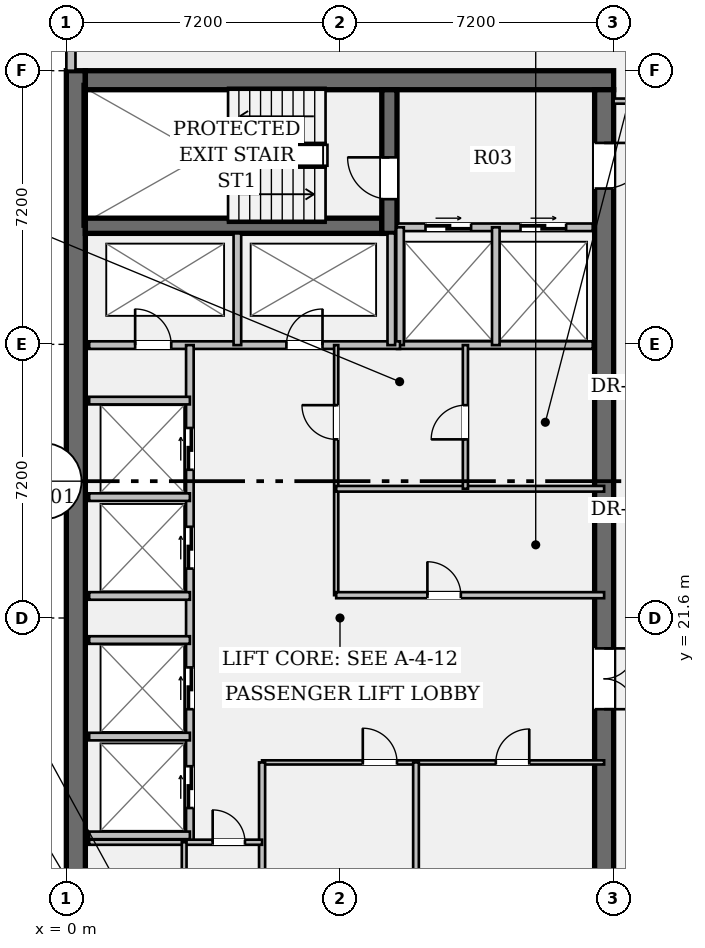
"""IFC4 building model, lengths in metres.
Left out: names, types, materials, properties, quantities, classifications, styles, units other than length and angle.
Written with IfcOpenShell. Run it as: python <this file> out.ifc"""

import sys

from ifc_helpers import new_model, si_unit, direction, frame, frame_2d, origin, place, context, subcontext, project, spatial, rectangle, extrude, element, fill, save


model = new_model("IFC4")
c1 = context("Model", 3, precision=1e-05, world=origin(), true_north=direction((0.0, 1.0)))
c2 = subcontext(c1, "Body", "Model", "MODEL_VIEW")
j1 = project(units=[si_unit("LENGTHUNIT", "METRE"), si_unit("PLANEANGLEUNIT", "RADIAN")], contexts=[c1])
p1 = place(None, origin())
s1 = spatial("IfcSite", under=j1, at=p1, CompositionType="ELEMENT")
p2 = place(p1, origin())
s2 = spatial("IfcBuilding", under=s1, at=p2, CompositionType="ELEMENT")
p3 = place(p2, frame((0.0, 0.0, 211.75)))
s3 = spatial("IfcBuildingStorey", under=s2, at=p3, CompositionType="ELEMENT", Elevation=211.75)
p4 = place(p3, frame((0.25, 7.2, 0.0), z_axis=(0.0, 0.0, 1.0), x_axis=(0.0, 1.0, 0.0)))
e1 = element("IfcWall", 1, at=p4, inside=s3, PredefinedType="SHEAR", context=c2, shape_type="SweptSolid", body=[
    extrude(rectangle(XDim=28.8, YDim=0.5, at=frame_2d((14.4, 0.0))), origin(), (0.0, 0.0, 1.0), 3.24),
])
p5 = place(p3, frame((0.5, 35.75, 0.0), z_axis=(0.0, 0.0, 1.0), x_axis=(1.0, 0.0, 0.0)))
e2 = element("IfcWall", 2, at=p5, inside=s3, PredefinedType="SHEAR", context=c2, shape_type="SweptSolid", body=[
    extrude(rectangle(XDim=13.9, YDim=0.5, at=frame_2d((6.95, 0.0))), origin(), (0.0, 0.0, 1.0), 3.24),
])
p6 = place(p3, frame((14.15, 35.5, 0.0), z_axis=(0.0, 0.0, 1.0), x_axis=(0.0, -1.0, 0.0)))
e3 = element("IfcWall", 3, at=p6, inside=s3, PredefinedType="SHEAR", context=c2, shape_type="SweptSolid", body=[
    extrude(rectangle(XDim=27.8, YDim=0.5, at=frame_2d((13.9, 0.0))), origin(), (0.0, 0.0, 1.0), 3.24),
])
p7 = place(p6, frame((1.4, 0.0, 0.0)))
e4 = element("IfcOpeningElement", 4, at=p7, cuts=e3, PredefinedType="OPENING", context=c2, shape_type="SweptSolid", body=[
    extrude(rectangle(XDim=1.2, YDim=2.15, at=frame_2d((0.6, 1.075))), frame((0.0, 0.262, 0.0), z_axis=(0.0, -1.0, 0.0), x_axis=(1.0, 0.0, 0.0)), (0.0, 0.0, 1.0), 0.524),
])
p8 = place(p6, frame((25.35, 0.0, 0.0)))
e5 = element("IfcOpeningElement", 5, at=p8, cuts=e3, PredefinedType="OPENING", context=c2, shape_type="SweptSolid", body=[
    extrude(rectangle(XDim=1.2, YDim=2.15, at=frame_2d((0.6, 1.075))), frame((0.0, 0.262, 0.0), z_axis=(0.0, -1.0, 0.0), x_axis=(1.0, 0.0, 0.0)), (0.0, 0.0, 1.0), 0.524),
])
p9 = place(p6, frame((14.7, 0.0, 0.0)))
e6 = element("IfcOpeningElement", 6, at=p9, cuts=e3, PredefinedType="OPENING", context=c2, shape_type="SweptSolid", body=[
    extrude(rectangle(XDim=1.6, YDim=2.2, at=frame_2d((0.8, 1.1))), frame((0.0, 0.262, 0.0), z_axis=(0.0, -1.0, 0.0), x_axis=(1.0, 0.0, 0.0)), (0.0, 0.0, 1.0), 0.524),
])
p10 = place(p3, frame((0.5, 31.92, 0.0), z_axis=(0.0, 0.0, 1.0), x_axis=(1.0, 0.0, 0.0)))
e7 = element("IfcWall", 7, at=p10, inside=s3, PredefinedType="SHEAR", context=c2, shape_type="SweptSolid", body=[
    extrude(rectangle(XDim=7.8, YDim=0.4, at=frame_2d((3.9, 0.0))), origin(), (0.0, 0.0, 1.0), 3.24),
])
p11 = place(p3, frame((8.5, 31.72, 0.0), z_axis=(0.0, 0.0, 1.0), x_axis=(0.0, 1.0, 0.0)))
e8 = element("IfcWall", 8, at=p11, inside=s3, PredefinedType="SHEAR", context=c2, shape_type="SweptSolid", body=[
    extrude(rectangle(XDim=3.78, YDim=0.4, at=frame_2d((1.89, 0.0))), origin(), (0.0, 0.0, 1.0), 3.24),
])
p12 = place(p11, frame((0.9, 0.0, 0.0)))
e9 = element("IfcOpeningElement", 9, at=p12, cuts=e8, PredefinedType="OPENING", context=c2, shape_type="SweptSolid", body=[
    extrude(rectangle(XDim=1.1, YDim=2.15, at=frame_2d((0.55, 1.075))), frame((0.0, 0.212, 0.0), z_axis=(0.0, -1.0, 0.0), x_axis=(1.0, 0.0, 0.0)), (0.0, 0.0, 1.0), 0.424),
])
p13 = place(p3, frame((0.12, 36.0, 0.0), z_axis=(0.0, 0.0, 1.0), x_axis=(0.0, 1.0, 0.0)))
e10 = element("IfcWall", 10, at=p13, inside=s3, PredefinedType="STANDARD", context=c2, shape_type="SweptSolid", body=[
    extrude(rectangle(XDim=1.25, YDim=0.24, at=frame_2d((0.625, 0.0))), origin(), (0.0, 0.0, 1.0), 3.24),
])
p14 = place(p3, frame((8.7, 31.88, 0.0), z_axis=(0.0, 0.0, 1.0), x_axis=(1.0, 0.0, 0.0)))
e11 = element("IfcWall", 11, at=p14, inside=s3, PredefinedType="PARTITIONING", context=c2, shape_type="SweptSolid", body=[
    extrude(rectangle(XDim=5.15, YDim=0.2, at=frame_2d((2.575, 0.0))), origin(), (0.0, 0.0, 1.0), 3.24),
])
p15 = place(p14, frame((0.75, 0.0, 0.0)))
e12 = element("IfcOpeningElement", 12, at=p15, cuts=e11, PredefinedType="OPENING", context=c2, shape_type="SweptSolid", body=[
    extrude(rectangle(XDim=1.2, YDim=2.2, at=frame_2d((0.6, 1.1))), frame((0.0, 0.112, 0.0), z_axis=(0.0, -1.0, 0.0), x_axis=(1.0, 0.0, 0.0)), (0.0, 0.0, 1.0), 0.224),
])
p16 = place(p14, frame((3.25, 0.0, 0.0)))
e13 = element("IfcOpeningElement", 13, at=p16, cuts=e11, PredefinedType="OPENING", context=c2, shape_type="SweptSolid", body=[
    extrude(rectangle(XDim=1.2, YDim=2.2, at=frame_2d((0.6, 1.1))), frame((0.0, 0.112, 0.0), z_axis=(0.0, -1.0, 0.0), x_axis=(1.0, 0.0, 0.0)), (0.0, 0.0, 1.0), 0.224),
])
p17 = place(p3, frame((8.7, 28.78, 0.0), z_axis=(0.0, 0.0, 1.0), x_axis=(1.0, 0.0, 0.0)))
e14 = element("IfcWall", 14, at=p17, inside=s3, PredefinedType="PARTITIONING", context=c2, shape_type="SweptSolid", body=[
    extrude(rectangle(XDim=5.15, YDim=0.2, at=frame_2d((2.575, 0.0))), origin(), (0.0, 0.0, 1.0), 3.24),
])
for number, where, z_axis, x_axis in (
    (15, (8.78, 28.78, 0.0), (0.0, 0.0, 1.0), (0.0, 1.0, 0.0)),
    (16, (11.3, 28.78, 0.0), (0.0, 0.0, 1.0), (0.0, 1.0, 0.0)),
):
    element("IfcWall", number, at=place(p3, frame(where, z_axis=z_axis, x_axis=x_axis)), inside=s3, PredefinedType="PARTITIONING", context=c2, shape_type="SweptSolid", body=[
        extrude(rectangle(XDim=3.1, YDim=0.2, at=frame_2d((1.55, 0.0))), origin(), (0.0, 0.0, 1.0), 3.24),
    ])
p18 = place(p3, frame((0.6, 28.78, 0.0), z_axis=(0.0, 0.0, 1.0), x_axis=(1.0, 0.0, 0.0)))
e17 = element("IfcWall", 17, at=p18, inside=s3, PredefinedType="PARTITIONING", context=c2, shape_type="SweptSolid", body=[
    extrude(rectangle(XDim=8.18, YDim=0.2, at=frame_2d((4.09, 0.0))), origin(), (0.0, 0.0, 1.0), 3.24),
])
p19 = place(p18, frame((1.21, 0.0, 0.0)))
e18 = element("IfcOpeningElement", 18, at=p19, cuts=e17, PredefinedType="OPENING", context=c2, shape_type="SweptSolid", body=[
    extrude(rectangle(XDim=0.95, YDim=2.15, at=frame_2d((0.475, 1.075))), frame((0.0, 0.112, 0.0), z_axis=(0.0, -1.0, 0.0), x_axis=(1.0, 0.0, 0.0)), (0.0, 0.0, 1.0), 0.224),
])
p20 = place(p18, frame((5.19, 0.0, 0.0)))
e19 = element("IfcOpeningElement", 19, at=p20, cuts=e17, PredefinedType="OPENING", context=c2, shape_type="SweptSolid", body=[
    extrude(rectangle(XDim=0.95, YDim=2.15, at=frame_2d((0.475, 1.075))), frame((0.0, 0.112, 0.0), z_axis=(0.0, -1.0, 0.0), x_axis=(1.0, 0.0, 0.0)), (0.0, 0.0, 1.0), 0.224),
])
for number, where, z_axis, x_axis in (
    (20, (4.5, 28.78, 0.0), (0.0, 0.0, 1.0), (0.0, 1.0, 0.0)),
    (21, (8.55, 28.78, 0.0), (0.0, 0.0, 1.0), (0.0, 1.0, 0.0)),
):
    element("IfcWall", number, at=place(p3, frame(where, z_axis=z_axis, x_axis=x_axis)), inside=s3, PredefinedType="PARTITIONING", context=c2, shape_type="SweptSolid", body=[
        extrude(rectangle(XDim=2.94, YDim=0.2, at=frame_2d((1.47, 0.0))), origin(), (0.0, 0.0, 1.0), 3.24),
    ])
p21 = place(p3, frame((3.25, 15.7, 0.0), z_axis=(0.0, 0.0, 1.0), x_axis=(0.0, 1.0, 0.0)))
e22 = element("IfcWall", 22, at=p21, inside=s3, PredefinedType="PARTITIONING", context=c2, shape_type="SweptSolid", body=[
    extrude(rectangle(XDim=13.08, YDim=0.2, at=frame_2d((6.54, 0.0))), origin(), (0.0, 0.0, 1.0), 3.24),
])
p22 = place(p21, frame((0.9, 0.0, 0.0)))
e23 = element("IfcOpeningElement", 23, at=p22, cuts=e22, PredefinedType="OPENING", context=c2, shape_type="SweptSolid", body=[
    extrude(rectangle(XDim=1.1, YDim=2.2, at=frame_2d((0.55, 1.1))), frame((0.0, 0.112, 0.0), z_axis=(0.0, -1.0, 0.0), x_axis=(1.0, 0.0, 0.0)), (0.0, 0.0, 1.0), 0.224),
])
p23 = place(p21, frame((3.5, 0.0, 0.0)))
e24 = element("IfcOpeningElement", 24, at=p23, cuts=e22, PredefinedType="OPENING", context=c2, shape_type="SweptSolid", body=[
    extrude(rectangle(XDim=1.1, YDim=2.2, at=frame_2d((0.55, 1.1))), frame((0.0, 0.112, 0.0), z_axis=(0.0, -1.0, 0.0), x_axis=(1.0, 0.0, 0.0)), (0.0, 0.0, 1.0), 0.224),
])
p24 = place(p21, frame((7.2, 0.0, 0.0)))
e25 = element("IfcOpeningElement", 25, at=p24, cuts=e22, PredefinedType="OPENING", context=c2, shape_type="SweptSolid", body=[
    extrude(rectangle(XDim=1.1, YDim=2.2, at=frame_2d((0.55, 1.1))), frame((0.0, 0.112, 0.0), z_axis=(0.0, -1.0, 0.0), x_axis=(1.0, 0.0, 0.0)), (0.0, 0.0, 1.0), 0.224),
])
p25 = place(p21, frame((9.8, 0.0, 0.0)))
e26 = element("IfcOpeningElement", 26, at=p25, cuts=e22, PredefinedType="OPENING", context=c2, shape_type="SweptSolid", body=[
    extrude(rectangle(XDim=1.1, YDim=2.2, at=frame_2d((0.55, 1.1))), frame((0.0, 0.112, 0.0), z_axis=(0.0, -1.0, 0.0), x_axis=(1.0, 0.0, 0.0)), (0.0, 0.0, 1.0), 0.224),
])
for number, where, z_axis, x_axis in (
    (27, (0.6, 15.88, 0.0), (0.0, 0.0, 1.0), (1.0, 0.0, 0.0)),
    (28, (0.6, 18.48, 0.0), (0.0, 0.0, 1.0), (1.0, 0.0, 0.0)),
    (29, (0.6, 22.18, 0.0), (0.0, 0.0, 1.0), (1.0, 0.0, 0.0)),
    (30, (0.6, 24.78, 0.0), (0.0, 0.0, 1.0), (1.0, 0.0, 0.0)),
    (31, (0.6, 21.02, 0.0), (0.0, 0.0, 1.0), (1.0, 0.0, 0.0)),
    (32, (0.6, 27.32, 0.0), (0.0, 0.0, 1.0), (1.0, 0.0, 0.0)),
):
    element("IfcWall", number, at=place(p3, frame(where, z_axis=z_axis, x_axis=x_axis)), inside=s3, PredefinedType="PARTITIONING", context=c2, shape_type="SweptSolid", body=[
        extrude(rectangle(XDim=2.65, YDim=0.2, at=frame_2d((1.325, 0.0))), origin(), (0.0, 0.0, 1.0), 3.24),
    ])
p26 = place(p3, frame((7.1, 22.2, 0.0), z_axis=(0.0, 0.0, 1.0), x_axis=(0.0, 1.0, 0.0)))
e33 = element("IfcWall", 33, at=p26, inside=s3, PredefinedType="PARTITIONING", context=c2, shape_type="SweptSolid", body=[
    extrude(rectangle(XDim=6.58, YDim=0.11, at=frame_2d((3.29, 0.0))), origin(), (0.0, 0.0, 1.0), 3.24),
])
p27 = place(p26, frame((4.1, 0.0, 0.0)))
e34 = element("IfcOpeningElement", 34, at=p27, cuts=e33, PredefinedType="OPENING", context=c2, shape_type="SweptSolid", body=[
    extrude(rectangle(XDim=0.9, YDim=2.15, at=frame_2d((0.45, 1.075))), frame((0.0, 0.067, 0.0), z_axis=(0.0, -1.0, 0.0), x_axis=(1.0, 0.0, 0.0)), (0.0, 0.0, 1.0), 0.134),
])
p28 = place(p3, frame((7.1, 22.2, 0.0), z_axis=(0.0, 0.0, 1.0), x_axis=(1.0, 0.0, 0.0)))
e35 = element("IfcWall", 35, at=p28, inside=s3, PredefinedType="PARTITIONING", context=c2, shape_type="SweptSolid", body=[
    extrude(rectangle(XDim=7.05, YDim=0.16, at=frame_2d((3.525, 0.0))), origin(), (0.0, 0.0, 1.0), 3.24),
])
p29 = place(p28, frame((2.4, 0.0, 0.0)))
e36 = element("IfcOpeningElement", 36, at=p29, cuts=e35, PredefinedType="OPENING", context=c2, shape_type="SweptSolid", body=[
    extrude(rectangle(XDim=0.88, YDim=2.15, at=frame_2d((0.44, 1.075))), frame((0.0, 0.092, 0.0), z_axis=(0.0, -1.0, 0.0), x_axis=(1.0, 0.0, 0.0)), (0.0, 0.0, 1.0), 0.184),
])
p30 = place(p3, frame((7.1, 25.0, 0.0), z_axis=(0.0, 0.0, 1.0), x_axis=(1.0, 0.0, 0.0)))
e37 = element("IfcWall", 37, at=p30, inside=s3, PredefinedType="PARTITIONING", context=c2, shape_type="SweptSolid", body=[
    extrude(rectangle(XDim=7.05, YDim=0.15, at=frame_2d((3.525, 0.0))), origin(), (0.0, 0.0, 1.0), 3.24),
])
p31 = place(p3, frame((10.5, 25.0, 0.0), z_axis=(0.0, 0.0, 1.0), x_axis=(0.0, 1.0, 0.0)))
e38 = element("IfcWall", 38, at=p31, inside=s3, PredefinedType="PARTITIONING", context=c2, shape_type="SweptSolid", body=[
    extrude(rectangle(XDim=3.78, YDim=0.135, at=frame_2d((1.89, 0.0))), origin(), (0.0, 0.0, 1.0), 3.24),
])
p32 = place(p31, frame((1.3, 0.0, 0.0)))
e39 = element("IfcOpeningElement", 39, at=p32, cuts=e38, PredefinedType="OPENING", context=c2, shape_type="SweptSolid", body=[
    extrude(rectangle(XDim=0.9, YDim=2.15, at=frame_2d((0.45, 1.075))), frame((0.0, 0.08, 0.0), z_axis=(0.0, -1.0, 0.0), x_axis=(1.0, 0.0, 0.0)), (0.0, 0.0, 1.0), 0.159),
])
p33 = place(p3, frame((5.15, 17.8, 0.0), z_axis=(0.0, 0.0, 1.0), x_axis=(1.0, 0.0, 0.0)))
e40 = element("IfcWall", 40, at=p33, inside=s3, PredefinedType="PARTITIONING", context=c2, shape_type="SweptSolid", body=[
    extrude(rectangle(XDim=9.0, YDim=0.11, at=frame_2d((4.5, 0.0))), origin(), (0.0, 0.0, 1.0), 3.24),
])
p34 = place(p33, frame((2.65, 0.0, 0.0)))
e41 = element("IfcOpeningElement", 41, at=p34, cuts=e40, PredefinedType="OPENING", context=c2, shape_type="SweptSolid", body=[
    extrude(rectangle(XDim=0.9, YDim=2.15, at=frame_2d((0.45, 1.075))), frame((0.0, 0.067, 0.0), z_axis=(0.0, -1.0, 0.0), x_axis=(1.0, 0.0, 0.0)), (0.0, 0.0, 1.0), 0.134),
])
p35 = place(p33, frame((6.15, 0.0, 0.0)))
e42 = element("IfcOpeningElement", 42, at=p35, cuts=e40, PredefinedType="OPENING", context=c2, shape_type="SweptSolid", body=[
    extrude(rectangle(XDim=0.88, YDim=2.15, at=frame_2d((0.44, 1.075))), frame((0.0, 0.067, 0.0), z_axis=(0.0, -1.0, 0.0), x_axis=(1.0, 0.0, 0.0)), (0.0, 0.0, 1.0), 0.134),
])
p36 = place(p3, frame((5.15, 11.2, 0.0), z_axis=(0.0, 0.0, 1.0), x_axis=(0.0, 1.0, 0.0)))
e43 = element("IfcWall", 43, at=p36, inside=s3, PredefinedType="PARTITIONING", context=c2, shape_type="SweptSolid", body=[
    extrude(rectangle(XDim=6.6, YDim=0.16, at=frame_2d((3.3, 0.0))), origin(), (0.0, 0.0, 1.0), 3.24),
])
p37 = place(p3, frame((9.2, 11.2, 0.0), z_axis=(0.0, 0.0, 1.0), x_axis=(0.0, 1.0, 0.0)))
e44 = element("IfcWall", 44, at=p37, inside=s3, PredefinedType="PARTITIONING", context=c2, shape_type="SweptSolid", body=[
    extrude(rectangle(XDim=6.6, YDim=0.15, at=frame_2d((3.3, 0.0))), origin(), (0.0, 0.0, 1.0), 3.24),
])
p38 = place(p3, frame((0.6, 15.7, 0.0), z_axis=(0.0, 0.0, 1.0), x_axis=(1.0, 0.0, 0.0)))
e45 = element("IfcWall", 45, at=p38, inside=s3, PredefinedType="PARTITIONING", context=c2, shape_type="SweptSolid", body=[
    extrude(rectangle(XDim=4.55, YDim=0.135, at=frame_2d((2.275, 0.0))), origin(), (0.0, 0.0, 1.0), 3.24),
])
p39 = place(p38, frame((3.25, 0.0, 0.0)))
e46 = element("IfcOpeningElement", 46, at=p39, cuts=e45, PredefinedType="OPENING", context=c2, shape_type="SweptSolid", body=[
    extrude(rectangle(XDim=0.85, YDim=2.15, at=frame_2d((0.425, 1.075))), frame((0.0, 0.08, 0.0), z_axis=(0.0, -1.0, 0.0), x_axis=(1.0, 0.0, 0.0)), (0.0, 0.0, 1.0), 0.159),
])
p40 = place(p3, frame((3.1, 11.28, 0.0), z_axis=(0.0, 0.0, 1.0), x_axis=(0.0, 1.0, 0.0)))
e47 = element("IfcWall", 47, at=p40, inside=s3, PredefinedType="PARTITIONING", context=c2, shape_type="SweptSolid", body=[
    extrude(rectangle(XDim=4.42, YDim=0.125, at=frame_2d((2.21, 0.0))), origin(), (0.0, 0.0, 1.0), 3.24),
])
p41 = place(p40, frame((0.65, 0.0, 0.0)))
e48 = element("IfcOpeningElement", 48, at=p41, cuts=e47, PredefinedType="OPENING", context=c2, shape_type="SweptSolid", body=[
    extrude(rectangle(XDim=0.85, YDim=2.15, at=frame_2d((0.425, 1.075))), frame((0.0, 0.074, 0.0), z_axis=(0.0, -1.0, 0.0), x_axis=(1.0, 0.0, 0.0)), (0.0, 0.0, 1.0), 0.149),
])
p42 = place(p40, frame((2.75, 0.0, 0.0)))
e49 = element("IfcOpeningElement", 49, at=p42, cuts=e47, PredefinedType="OPENING", context=c2, shape_type="SweptSolid", body=[
    extrude(rectangle(XDim=0.85, YDim=2.15, at=frame_2d((0.425, 1.075))), frame((0.0, 0.074, 0.0), z_axis=(0.0, -1.0, 0.0), x_axis=(1.0, 0.0, 0.0)), (0.0, 0.0, 1.0), 0.149),
])
p43 = place(p3, frame((14.4, 35.2, 0.0), z_axis=(0.0, 0.0, 1.0), x_axis=(1.0, 0.0, 0.0)))
e50 = element("IfcWall", 50, at=p43, inside=s3, PredefinedType="PARTITIONING", context=c2, shape_type="SweptSolid", body=[
    extrude(rectangle(XDim=2.95, YDim=0.135, at=frame_2d((1.475, 0.0))), origin(), (0.0, 0.0, 1.0), 2.808),
])
p44 = place(p43, frame((0.95, 0.0, 0.0)))
e51 = element("IfcOpeningElement", 51, at=p44, cuts=e50, PredefinedType="OPENING", context=c2, shape_type="SweptSolid", body=[
    extrude(rectangle(XDim=1.0, YDim=2.15, at=frame_2d((0.5, 1.075))), frame((0.0, 0.08, 0.0), z_axis=(0.0, -1.0, 0.0), x_axis=(1.0, 0.0, 0.0)), (0.0, 0.0, 1.0), 0.159),
])
p45 = place(p12, origin())
e52 = element("IfcDoor", 52, at=p45, inside=s3, OperationType="SINGLE_SWING_RIGHT", PredefinedType="DOOR", context=c2, shape_type="SweptSolid", body=[
    extrude(rectangle(XDim=1.1, YDim=2.15, at=frame_2d((0.55, 1.075))), frame((0.0, 0.025, 0.0), z_axis=(0.0, -1.0, 0.0), x_axis=(1.0, 0.0, 0.0)), (0.0, 0.0, 1.0), 0.05),
])
fill(e9, e52)
p46 = place(p7, origin())
e53 = element("IfcDoor", 53, at=p46, inside=s3, OperationType="SINGLE_SWING_LEFT", PredefinedType="DOOR", context=c2, shape_type="SweptSolid", body=[
    extrude(rectangle(XDim=1.2, YDim=2.15, at=frame_2d((0.6, 1.075))), frame((0.0, 0.025, 0.0), z_axis=(0.0, -1.0, 0.0), x_axis=(1.0, 0.0, 0.0)), (0.0, 0.0, 1.0), 0.05),
])
fill(e4, e53)
p47 = place(p15, origin())
e54 = element("IfcDoor", 54, at=p47, inside=s3, OperationType="DOUBLE_DOOR_SLIDING", PredefinedType="DOOR", context=c2, shape_type="SweptSolid", body=[
    extrude(rectangle(XDim=1.2, YDim=2.2, at=frame_2d((0.6, 1.1))), frame((0.0, 0.025, 0.0), z_axis=(0.0, -1.0, 0.0), x_axis=(1.0, 0.0, 0.0)), (0.0, 0.0, 1.0), 0.05),
])
fill(e12, e54)
p48 = place(p16, origin())
e55 = element("IfcDoor", 55, at=p48, inside=s3, OperationType="DOUBLE_DOOR_SLIDING", PredefinedType="DOOR", context=c2, shape_type="SweptSolid", body=[
    extrude(rectangle(XDim=1.2, YDim=2.2, at=frame_2d((0.6, 1.1))), frame((0.0, 0.025, 0.0), z_axis=(0.0, -1.0, 0.0), x_axis=(1.0, 0.0, 0.0)), (0.0, 0.0, 1.0), 0.05),
])
fill(e13, e55)
p49 = place(p19, origin())
e56 = element("IfcDoor", 56, at=p49, inside=s3, OperationType="SINGLE_SWING_LEFT", PredefinedType="DOOR", context=c2, shape_type="SweptSolid", body=[
    extrude(rectangle(XDim=0.95, YDim=2.15, at=frame_2d((0.475, 1.075))), frame((0.0, 0.025, 0.0), z_axis=(0.0, -1.0, 0.0), x_axis=(1.0, 0.0, 0.0)), (0.0, 0.0, 1.0), 0.05),
])
fill(e18, e56)
p50 = place(p20, origin())
e57 = element("IfcDoor", 57, at=p50, inside=s3, OperationType="SINGLE_SWING_RIGHT", PredefinedType="DOOR", context=c2, shape_type="SweptSolid", body=[
    extrude(rectangle(XDim=0.95, YDim=2.15, at=frame_2d((0.475, 1.075))), frame((0.0, 0.025, 0.0), z_axis=(0.0, -1.0, 0.0), x_axis=(1.0, 0.0, 0.0)), (0.0, 0.0, 1.0), 0.05),
])
fill(e19, e57)
p51 = place(p9, origin())
e58 = element("IfcDoor", 58, at=p51, inside=s3, OperationType="DOUBLE_DOOR_SINGLE_SWING", PredefinedType="DOOR", context=c2, shape_type="SweptSolid", body=[
    extrude(rectangle(XDim=1.6, YDim=2.2, at=frame_2d((0.8, 1.1))), frame((0.0, 0.025, 0.0), z_axis=(0.0, -1.0, 0.0), x_axis=(1.0, 0.0, 0.0)), (0.0, 0.0, 1.0), 0.05),
])
fill(e6, e58)
p52 = place(p22, origin())
e59 = element("IfcDoor", 59, at=p52, inside=s3, OperationType="DOUBLE_DOOR_SLIDING", PredefinedType="DOOR", context=c2, shape_type="SweptSolid", body=[
    extrude(rectangle(XDim=1.1, YDim=2.2, at=frame_2d((0.55, 1.1))), frame((0.0, 0.025, 0.0), z_axis=(0.0, -1.0, 0.0), x_axis=(1.0, 0.0, 0.0)), (0.0, 0.0, 1.0), 0.05),
])
fill(e23, e59)
p53 = place(p23, origin())
e60 = element("IfcDoor", 60, at=p53, inside=s3, OperationType="DOUBLE_DOOR_SLIDING", PredefinedType="DOOR", context=c2, shape_type="SweptSolid", body=[
    extrude(rectangle(XDim=1.1, YDim=2.2, at=frame_2d((0.55, 1.1))), frame((0.0, 0.025, 0.0), z_axis=(0.0, -1.0, 0.0), x_axis=(1.0, 0.0, 0.0)), (0.0, 0.0, 1.0), 0.05),
])
fill(e24, e60)
p54 = place(p24, origin())
e61 = element("IfcDoor", 61, at=p54, inside=s3, OperationType="DOUBLE_DOOR_SLIDING", PredefinedType="DOOR", context=c2, shape_type="SweptSolid", body=[
    extrude(rectangle(XDim=1.1, YDim=2.2, at=frame_2d((0.55, 1.1))), frame((0.0, 0.025, 0.0), z_axis=(0.0, -1.0, 0.0), x_axis=(1.0, 0.0, 0.0)), (0.0, 0.0, 1.0), 0.05),
])
fill(e25, e61)
p55 = place(p25, origin())
e62 = element("IfcDoor", 62, at=p55, inside=s3, OperationType="DOUBLE_DOOR_SLIDING", PredefinedType="DOOR", context=c2, shape_type="SweptSolid", body=[
    extrude(rectangle(XDim=1.1, YDim=2.2, at=frame_2d((0.55, 1.1))), frame((0.0, 0.025, 0.0), z_axis=(0.0, -1.0, 0.0), x_axis=(1.0, 0.0, 0.0)), (0.0, 0.0, 1.0), 0.05),
])
fill(e26, e62)
p56 = place(p29, origin())
e63 = element("IfcDoor", 63, at=p56, inside=s3, OperationType="SINGLE_SWING_LEFT", PredefinedType="DOOR", context=c2, shape_type="SweptSolid", body=[
    extrude(rectangle(XDim=0.88, YDim=2.15, at=frame_2d((0.44, 1.075))), frame((0.0, 0.025, 0.0), z_axis=(0.0, -1.0, 0.0), x_axis=(1.0, 0.0, 0.0)), (0.0, 0.0, 1.0), 0.05),
])
fill(e36, e63)
p57 = place(p27, origin())
e64 = element("IfcDoor", 64, at=p57, inside=s3, OperationType="SINGLE_SWING_RIGHT", PredefinedType="DOOR", context=c2, shape_type="SweptSolid", body=[
    extrude(rectangle(XDim=0.9, YDim=2.15, at=frame_2d((0.45, 1.075))), frame((0.0, 0.025, 0.0), z_axis=(0.0, -1.0, 0.0), x_axis=(1.0, 0.0, 0.0)), (0.0, 0.0, 1.0), 0.05),
])
fill(e34, e64)
p58 = place(p32, origin())
e65 = element("IfcDoor", 65, at=p58, inside=s3, OperationType="SINGLE_SWING_LEFT", PredefinedType="DOOR", context=c2, shape_type="SweptSolid", body=[
    extrude(rectangle(XDim=0.9, YDim=2.15, at=frame_2d((0.45, 1.075))), frame((0.0, 0.025, 0.0), z_axis=(0.0, -1.0, 0.0), x_axis=(1.0, 0.0, 0.0)), (0.0, 0.0, 1.0), 0.05),
])
fill(e39, e65)
p59 = place(p34, origin())
e66 = element("IfcDoor", 66, at=p59, inside=s3, OperationType="SINGLE_SWING_LEFT", PredefinedType="DOOR", context=c2, shape_type="SweptSolid", body=[
    extrude(rectangle(XDim=0.9, YDim=2.15, at=frame_2d((0.45, 1.075))), frame((0.0, 0.025, 0.0), z_axis=(0.0, -1.0, 0.0), x_axis=(1.0, 0.0, 0.0)), (0.0, 0.0, 1.0), 0.05),
])
fill(e41, e66)
p60 = place(p35, origin())
e67 = element("IfcDoor", 67, at=p60, inside=s3, OperationType="SINGLE_SWING_RIGHT", PredefinedType="DOOR", context=c2, shape_type="SweptSolid", body=[
    extrude(rectangle(XDim=0.88, YDim=2.15, at=frame_2d((0.44, 1.075))), frame((0.0, 0.025, 0.0), z_axis=(0.0, -1.0, 0.0), x_axis=(1.0, 0.0, 0.0)), (0.0, 0.0, 1.0), 0.05),
])
fill(e42, e67)
p61 = place(p39, origin())
e68 = element("IfcDoor", 68, at=p61, inside=s3, OperationType="SINGLE_SWING_LEFT", PredefinedType="DOOR", context=c2, shape_type="SweptSolid", body=[
    extrude(rectangle(XDim=0.85, YDim=2.15, at=frame_2d((0.425, 1.075))), frame((0.0, 0.025, 0.0), z_axis=(0.0, -1.0, 0.0), x_axis=(1.0, 0.0, 0.0)), (0.0, 0.0, 1.0), 0.05),
])
fill(e46, e68)
save(model, sys.argv[1])
